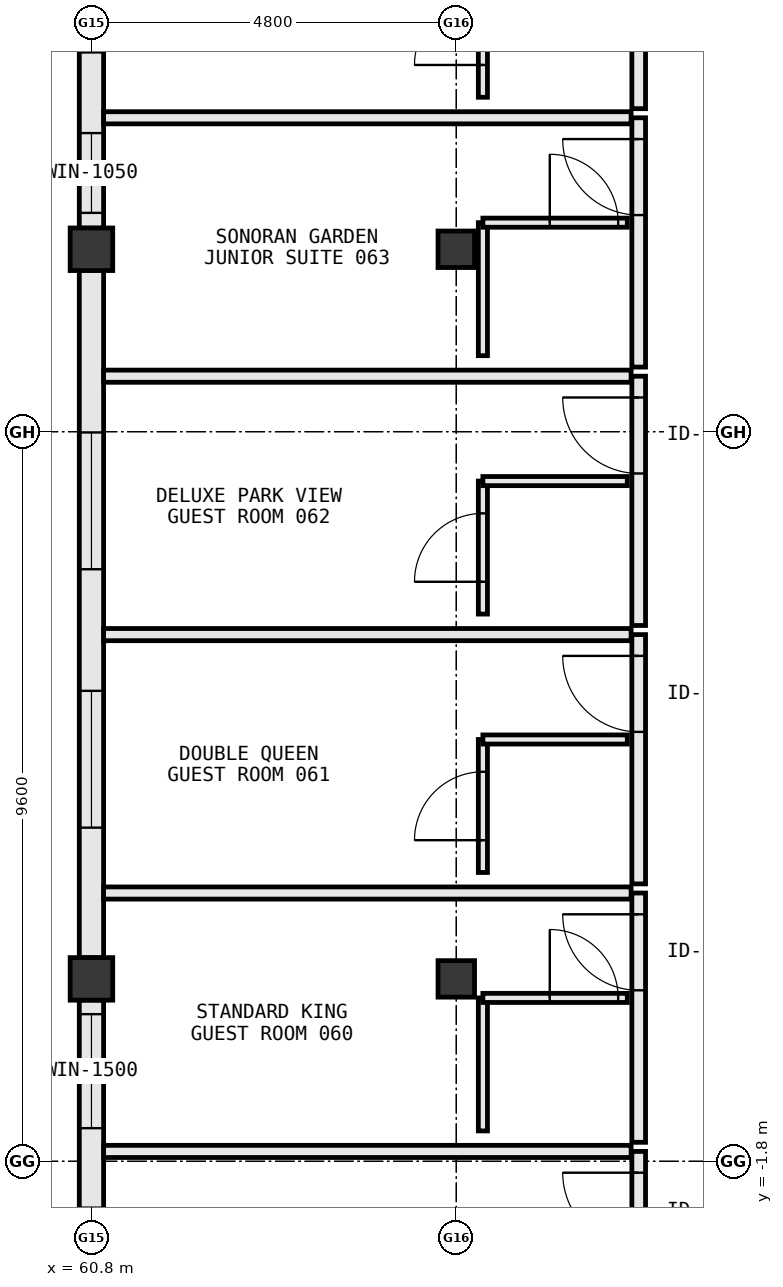
"""IFC4 building model, lengths in metres.
Left out: names, types, materials, properties, quantities, classifications, styles, units other than length and angle.
Written with IfcOpenShell. Run it as: python <this file> out.ifc"""

import sys

from ifc_helpers import new_model, si_unit, direction, frame, frame_2d, origin, origin_2d, place, context, subcontext, project, spatial, rectangle, extrude, element, fill, save


model = new_model("IFC4")
c1 = context("Model", 3, precision=1e-05, world=origin(), true_north=direction((0.0, 1.0)))
c2 = subcontext(c1, "Body", "Model", "MODEL_VIEW")
j1 = project(units=[si_unit("LENGTHUNIT", "METRE"), si_unit("PLANEANGLEUNIT", "RADIAN")], contexts=[c1])
p1 = place(None, origin())
s1 = spatial("IfcSite", under=j1, at=p1, CompositionType="ELEMENT")
p2 = place(p1, origin())
s2 = spatial("IfcBuilding", under=s1, at=p2, CompositionType="ELEMENT")
p3 = place(p2, frame((0.0, 0.0, 16.2)))
s3 = spatial("IfcBuildingStorey", under=s2, at=p3, CompositionType="ELEMENT", Elevation=16.2)
for number, where, z_axis, x_axis in (
    (1, (60.8, 0.6, 0.0), (0.0, 0.0, 1.0), (1.0, 0.0, 0.0)),
    (2, (60.8, 10.2, 0.0), (0.0, 0.0, 1.0), (1.0, 0.0, 0.0)),
):
    element("IfcColumn", number, at=place(p3, frame(where, z_axis=z_axis, x_axis=x_axis)), inside=s3, PredefinedType="COLUMN", context=c2, shape_type="SweptSolid", body=[
        extrude(rectangle(XDim=0.56, YDim=0.56, at=origin_2d()), origin(), (0.0, 0.0, 1.0), 3.8),
    ])
for number, where, z_axis, x_axis in (
    (3, (65.6, 0.6, 0.0), (0.0, 0.0, 1.0), (1.0, 0.0, 0.0)),
    (4, (65.6, 10.2, 0.0), (0.0, 0.0, 1.0), (1.0, 0.0, 0.0)),
):
    element("IfcColumn", number, at=place(p3, frame(where, z_axis=z_axis, x_axis=x_axis)), inside=s3, PredefinedType="COLUMN", context=c2, shape_type="SweptSolid", body=[
        extrude(rectangle(XDim=0.48, YDim=0.48, at=origin_2d()), origin(), (0.0, 0.0, 1.0), 3.8),
    ])
p4 = place(p3, frame((60.8, 18.322, 0.0), z_axis=(0.0, 0.0, 1.0), x_axis=(0.0, -1.0, 0.0)))
e5 = element("IfcWall", 5, at=p4, inside=s3, PredefinedType="STANDARD", context=c2, shape_type="SweptSolid", body=[
    extrude(rectangle(XDim=7.844, YDim=0.32, at=frame_2d((3.922, 0.0))), origin(), (0.0, 0.0, 1.0), 3.015),
])
p5 = place(p4, frame((6.593, 0.0, 0.85)))
e6 = element("IfcOpeningElement", 6, at=p5, cuts=e5, PredefinedType="OPENING", context=c2, shape_type="SweptSolid", body=[
    extrude(rectangle(XDim=1.05, YDim=1.45, at=frame_2d((0.525, 0.725))), frame((0.0, 0.172, 0.0), z_axis=(0.0, -1.0, 0.0), x_axis=(1.0, 0.0, 0.0)), (0.0, 0.0, 1.0), 0.344),
])
p6 = place(p4, frame((3.732, 0.0, 0.85)))
e7 = element("IfcOpeningElement", 7, at=p6, cuts=e5, PredefinedType="OPENING", context=c2, shape_type="SweptSolid", body=[
    extrude(rectangle(XDim=1.8, YDim=1.85, at=frame_2d((0.9, 0.925))), frame((0.0, 0.172, 0.0), z_axis=(0.0, -1.0, 0.0), x_axis=(1.0, 0.0, 0.0)), (0.0, 0.0, 1.0), 0.344),
])
p7 = place(p4, frame((0.536, 0.0, 0.85)))
e8 = element("IfcOpeningElement", 8, at=p7, cuts=e5, PredefinedType="OPENING", context=c2, shape_type="SweptSolid", body=[
    extrude(rectangle(XDim=1.8, YDim=1.85, at=frame_2d((0.9, 0.925))), frame((0.0, 0.172, 0.0), z_axis=(0.0, -1.0, 0.0), x_axis=(1.0, 0.0, 0.0)), (0.0, 0.0, 1.0), 0.344),
])
p8 = place(p3, frame((60.8, 9.922, 0.0), z_axis=(0.0, 0.0, 1.0), x_axis=(0.0, -1.0, 0.0)))
e9 = element("IfcWall", 9, at=p8, inside=s3, PredefinedType="STANDARD", context=c2, shape_type="SweptSolid", body=[
    extrude(rectangle(XDim=9.044, YDim=0.32, at=frame_2d((4.522, 0.0))), origin(), (0.0, 0.0, 1.0), 2.915),
])
p9 = place(p8, frame((5.532, 0.0, 0.85)))
e10 = element("IfcOpeningElement", 10, at=p9, cuts=e9, PredefinedType="OPENING", context=c2, shape_type="SweptSolid", body=[
    extrude(rectangle(XDim=1.8, YDim=1.85, at=frame_2d((0.9, 0.925))), frame((0.0, 0.172, 0.0), z_axis=(0.0, -1.0, 0.0), x_axis=(1.0, 0.0, 0.0)), (0.0, 0.0, 1.0), 0.344),
])
p10 = place(p8, frame((2.132, 0.0, 0.85)))
e11 = element("IfcOpeningElement", 11, at=p10, cuts=e9, PredefinedType="OPENING", context=c2, shape_type="SweptSolid", body=[
    extrude(rectangle(XDim=1.8, YDim=1.85, at=frame_2d((0.9, 0.925))), frame((0.0, 0.172, 0.0), z_axis=(0.0, -1.0, 0.0), x_axis=(1.0, 0.0, 0.0)), (0.0, 0.0, 1.0), 0.344),
])
p11 = place(p3, frame((60.8, 0.322, 0.0), z_axis=(0.0, 0.0, 1.0), x_axis=(0.0, -1.0, 0.0)))
e12 = element("IfcWall", 12, at=p11, inside=s3, PredefinedType="STANDARD", context=c2, shape_type="SweptSolid", body=[
    extrude(rectangle(XDim=9.044, YDim=0.32, at=frame_2d((4.522, 0.0))), origin(), (0.0, 0.0, 1.0), 2.915),
])
p12 = place(p11, frame((5.808, 0.0, 0.85)))
e13 = element("IfcOpeningElement", 13, at=p12, cuts=e12, PredefinedType="OPENING", context=c2, shape_type="SweptSolid", body=[
    extrude(rectangle(XDim=1.95, YDim=1.9, at=frame_2d((0.975, 0.95))), frame((0.0, 0.172, 0.0), z_axis=(0.0, -1.0, 0.0), x_axis=(1.0, 0.0, 0.0)), (0.0, 0.0, 1.0), 0.344),
])
p13 = place(p11, frame((2.732, 0.0, 0.85)))
e14 = element("IfcOpeningElement", 14, at=p13, cuts=e12, PredefinedType="OPENING", context=c2, shape_type="SweptSolid", body=[
    extrude(rectangle(XDim=1.8, YDim=1.85, at=frame_2d((0.9, 0.925))), frame((0.0, 0.172, 0.0), z_axis=(0.0, -1.0, 0.0), x_axis=(1.0, 0.0, 0.0)), (0.0, 0.0, 1.0), 0.344),
])
p14 = place(p11, frame((0.186, 0.0, 0.85)))
e15 = element("IfcOpeningElement", 15, at=p14, cuts=e12, PredefinedType="OPENING", context=c2, shape_type="SweptSolid", body=[
    extrude(rectangle(XDim=1.5, YDim=1.75, at=frame_2d((0.75, 0.875))), frame((0.0, 0.172, 0.0), z_axis=(0.0, -1.0, 0.0), x_axis=(1.0, 0.0, 0.0)), (0.0, 0.0, 1.0), 0.344),
])
p15 = place(p3, frame((68.0, -4.95, 0.0), z_axis=(0.0, 0.0, 1.0), x_axis=(0.0, 1.0, 0.0)))
e16 = element("IfcWall", 16, at=p15, inside=s3, PredefinedType="PARTITIONING", context=c2, shape_type="SweptSolid", body=[
    extrude(rectangle(XDim=3.28, YDim=0.18, at=frame_2d((1.64, 0.0))), origin(), (0.0, 0.0, 1.0), 3.56),
])
p16 = place(p15, frame((2.0, 0.0, 0.0)))
e17 = element("IfcOpeningElement", 17, at=p16, cuts=e16, PredefinedType="OPENING", context=c2, shape_type="SweptSolid", body=[
    extrude(rectangle(XDim=1.0, YDim=2.2, at=frame_2d((0.5, 1.1))), frame((0.0, 0.102, 0.0), z_axis=(0.0, -1.0, 0.0), x_axis=(1.0, 0.0, 0.0)), (0.0, 0.0, 1.0), 0.204),
])
p17 = place(p3, frame((60.96, -1.67, 0.0), z_axis=(0.0, 0.0, 1.0), x_axis=(1.0, 0.0, 0.0)))
e18 = element("IfcWall", 18, at=p17, inside=s3, PredefinedType="PARTITIONING", context=c2, shape_type="SweptSolid", body=[
    extrude(rectangle(XDim=6.94, YDim=0.16, at=frame_2d((3.47, 0.0))), origin(), (0.0, 0.0, 1.0), 3.56),
])
p18 = place(p3, frame((68.0, -1.55, 0.0), z_axis=(0.0, 0.0, 1.0), x_axis=(0.0, 1.0, 0.0)))
e19 = element("IfcWall", 19, at=p18, inside=s3, PredefinedType="PARTITIONING", context=c2, shape_type="SweptSolid", body=[
    extrude(rectangle(XDim=3.28, YDim=0.18, at=frame_2d((1.64, 0.0))), origin(), (0.0, 0.0, 1.0), 3.56),
])
p19 = place(p18, frame((2.0, 0.0, 0.0)))
e20 = element("IfcOpeningElement", 20, at=p19, cuts=e19, PredefinedType="OPENING", context=c2, shape_type="SweptSolid", body=[
    extrude(rectangle(XDim=1.0, YDim=2.2, at=frame_2d((0.5, 1.1))), frame((0.0, 0.102, 0.0), z_axis=(0.0, -1.0, 0.0), x_axis=(1.0, 0.0, 0.0)), (0.0, 0.0, 1.0), 0.204),
])
p20 = place(p3, frame((60.96, 1.73, 0.0), z_axis=(0.0, 0.0, 1.0), x_axis=(1.0, 0.0, 0.0)))
e21 = element("IfcWall", 21, at=p20, inside=s3, PredefinedType="PARTITIONING", context=c2, shape_type="SweptSolid", body=[
    extrude(rectangle(XDim=6.94, YDim=0.16, at=frame_2d((3.47, 0.0))), origin(), (0.0, 0.0, 1.0), 3.56),
])
p21 = place(p3, frame((65.95, -1.4, 0.0), z_axis=(0.0, 0.0, 1.0), x_axis=(0.0, 1.0, 0.0)))
e22 = element("IfcWall", 22, at=p21, inside=s3, PredefinedType="PARTITIONING", context=c2, shape_type="SweptSolid", body=[
    extrude(rectangle(XDim=1.75, YDim=0.12, at=frame_2d((0.875, 0.0))), origin(), (0.0, 0.0, 1.0), 2.915),
])
p22 = place(p3, frame((65.95, 0.35, 0.0), z_axis=(0.0, 0.0, 1.0), x_axis=(1.0, 0.0, 0.0)))
e23 = element("IfcWall", 23, at=p22, inside=s3, PredefinedType="PARTITIONING", context=c2, shape_type="SweptSolid", body=[
    extrude(rectangle(XDim=1.9, YDim=0.12, at=frame_2d((0.95, 0.0))), origin(), (0.0, 0.0, 1.0), 2.915),
])
p23 = place(p22, frame((0.88, 0.0, 0.0)))
e24 = element("IfcOpeningElement", 24, at=p23, cuts=e23, PredefinedType="OPENING", context=c2, shape_type="SweptSolid", body=[
    extrude(rectangle(XDim=0.9, YDim=2.15, at=frame_2d((0.45, 1.075))), frame((0.0, 0.072, 0.0), z_axis=(0.0, -1.0, 0.0), x_axis=(1.0, 0.0, 0.0)), (0.0, 0.0, 1.0), 0.144),
])
p24 = place(p3, frame((68.0, 1.85, 0.0), z_axis=(0.0, 0.0, 1.0), x_axis=(0.0, 1.0, 0.0)))
e25 = element("IfcWall", 25, at=p24, inside=s3, PredefinedType="PARTITIONING", context=c2, shape_type="SweptSolid", body=[
    extrude(rectangle(XDim=3.28, YDim=0.18, at=frame_2d((1.64, 0.0))), origin(), (0.0, 0.0, 1.0), 3.56),
])
p25 = place(p24, frame((2.0, 0.0, 0.0)))
e26 = element("IfcOpeningElement", 26, at=p25, cuts=e25, PredefinedType="OPENING", context=c2, shape_type="SweptSolid", body=[
    extrude(rectangle(XDim=1.0, YDim=2.2, at=frame_2d((0.5, 1.1))), frame((0.0, 0.102, 0.0), z_axis=(0.0, -1.0, 0.0), x_axis=(1.0, 0.0, 0.0)), (0.0, 0.0, 1.0), 0.204),
])
p26 = place(p3, frame((60.96, 5.13, 0.0), z_axis=(0.0, 0.0, 1.0), x_axis=(1.0, 0.0, 0.0)))
e27 = element("IfcWall", 27, at=p26, inside=s3, PredefinedType="PARTITIONING", context=c2, shape_type="SweptSolid", body=[
    extrude(rectangle(XDim=6.94, YDim=0.16, at=frame_2d((3.47, 0.0))), origin(), (0.0, 0.0, 1.0), 3.56),
])
p27 = place(p3, frame((65.95, 2.0, 0.0), z_axis=(0.0, 0.0, 1.0), x_axis=(0.0, 1.0, 0.0)))
e28 = element("IfcWall", 28, at=p27, inside=s3, PredefinedType="PARTITIONING", context=c2, shape_type="SweptSolid", body=[
    extrude(rectangle(XDim=1.75, YDim=0.12, at=frame_2d((0.875, 0.0))), origin(), (0.0, 0.0, 1.0), 2.915),
])
p28 = place(p27, frame((0.425, 0.0, 0.0)))
e29 = element("IfcOpeningElement", 29, at=p28, cuts=e28, PredefinedType="OPENING", context=c2, shape_type="SweptSolid", body=[
    extrude(rectangle(XDim=0.9, YDim=2.15, at=frame_2d((0.45, 1.075))), frame((0.0, 0.072, 0.0), z_axis=(0.0, -1.0, 0.0), x_axis=(1.0, 0.0, 0.0)), (0.0, 0.0, 1.0), 0.144),
])
p29 = place(p3, frame((65.95, 3.75, 0.0), z_axis=(0.0, 0.0, 1.0), x_axis=(1.0, 0.0, 0.0)))
e30 = element("IfcWall", 30, at=p29, inside=s3, PredefinedType="PARTITIONING", context=c2, shape_type="SweptSolid", body=[
    extrude(rectangle(XDim=1.9, YDim=0.12, at=frame_2d((0.95, 0.0))), origin(), (0.0, 0.0, 1.0), 3.56),
])
p30 = place(p3, frame((68.0, 5.25, 0.0), z_axis=(0.0, 0.0, 1.0), x_axis=(0.0, 1.0, 0.0)))
e31 = element("IfcWall", 31, at=p30, inside=s3, PredefinedType="PARTITIONING", context=c2, shape_type="SweptSolid", body=[
    extrude(rectangle(XDim=3.28, YDim=0.18, at=frame_2d((1.64, 0.0))), origin(), (0.0, 0.0, 1.0), 3.56),
])
p31 = place(p30, frame((2.0, 0.0, 0.0)))
e32 = element("IfcOpeningElement", 32, at=p31, cuts=e31, PredefinedType="OPENING", context=c2, shape_type="SweptSolid", body=[
    extrude(rectangle(XDim=1.0, YDim=2.2, at=frame_2d((0.5, 1.1))), frame((0.0, 0.102, 0.0), z_axis=(0.0, -1.0, 0.0), x_axis=(1.0, 0.0, 0.0)), (0.0, 0.0, 1.0), 0.204),
])
p32 = place(p3, frame((60.96, 8.53, 0.0), z_axis=(0.0, 0.0, 1.0), x_axis=(1.0, 0.0, 0.0)))
e33 = element("IfcWall", 33, at=p32, inside=s3, PredefinedType="PARTITIONING", context=c2, shape_type="SweptSolid", body=[
    extrude(rectangle(XDim=6.94, YDim=0.16, at=frame_2d((3.47, 0.0))), origin(), (0.0, 0.0, 1.0), 3.56),
])
p33 = place(p3, frame((65.95, 5.4, 0.0), z_axis=(0.0, 0.0, 1.0), x_axis=(0.0, 1.0, 0.0)))
e34 = element("IfcWall", 34, at=p33, inside=s3, PredefinedType="PARTITIONING", context=c2, shape_type="SweptSolid", body=[
    extrude(rectangle(XDim=1.75, YDim=0.12, at=frame_2d((0.875, 0.0))), origin(), (0.0, 0.0, 1.0), 2.915),
])
p34 = place(p33, frame((0.425, 0.0, 0.0)))
e35 = element("IfcOpeningElement", 35, at=p34, cuts=e34, PredefinedType="OPENING", context=c2, shape_type="SweptSolid", body=[
    extrude(rectangle(XDim=0.9, YDim=2.15, at=frame_2d((0.45, 1.075))), frame((0.0, 0.072, 0.0), z_axis=(0.0, -1.0, 0.0), x_axis=(1.0, 0.0, 0.0)), (0.0, 0.0, 1.0), 0.144),
])
p35 = place(p3, frame((65.95, 7.15, 0.0), z_axis=(0.0, 0.0, 1.0), x_axis=(1.0, 0.0, 0.0)))
e36 = element("IfcWall", 36, at=p35, inside=s3, PredefinedType="PARTITIONING", context=c2, shape_type="SweptSolid", body=[
    extrude(rectangle(XDim=1.9, YDim=0.12, at=frame_2d((0.95, 0.0))), origin(), (0.0, 0.0, 1.0), 3.56),
])
p36 = place(p3, frame((68.0, 8.65, 0.0), z_axis=(0.0, 0.0, 1.0), x_axis=(0.0, 1.0, 0.0)))
e37 = element("IfcWall", 37, at=p36, inside=s3, PredefinedType="PARTITIONING", context=c2, shape_type="SweptSolid", body=[
    extrude(rectangle(XDim=3.28, YDim=0.18, at=frame_2d((1.64, 0.0))), origin(), (0.0, 0.0, 1.0), 3.56),
])
p37 = place(p36, frame((2.0, 0.0, 0.0)))
e38 = element("IfcOpeningElement", 38, at=p37, cuts=e37, PredefinedType="OPENING", context=c2, shape_type="SweptSolid", body=[
    extrude(rectangle(XDim=1.0, YDim=2.2, at=frame_2d((0.5, 1.1))), frame((0.0, 0.102, 0.0), z_axis=(0.0, -1.0, 0.0), x_axis=(1.0, 0.0, 0.0)), (0.0, 0.0, 1.0), 0.204),
])
p38 = place(p3, frame((60.96, 11.93, 0.0), z_axis=(0.0, 0.0, 1.0), x_axis=(1.0, 0.0, 0.0)))
e39 = element("IfcWall", 39, at=p38, inside=s3, PredefinedType="PARTITIONING", context=c2, shape_type="SweptSolid", body=[
    extrude(rectangle(XDim=6.94, YDim=0.16, at=frame_2d((3.47, 0.0))), origin(), (0.0, 0.0, 1.0), 3.56),
])
p39 = place(p3, frame((65.95, 8.8, 0.0), z_axis=(0.0, 0.0, 1.0), x_axis=(0.0, 1.0, 0.0)))
e40 = element("IfcWall", 40, at=p39, inside=s3, PredefinedType="PARTITIONING", context=c2, shape_type="SweptSolid", body=[
    extrude(rectangle(XDim=1.75, YDim=0.12, at=frame_2d((0.875, 0.0))), origin(), (0.0, 0.0, 1.0), 2.915),
])
p40 = place(p3, frame((65.95, 10.55, 0.0), z_axis=(0.0, 0.0, 1.0), x_axis=(1.0, 0.0, 0.0)))
e41 = element("IfcWall", 41, at=p40, inside=s3, PredefinedType="PARTITIONING", context=c2, shape_type="SweptSolid", body=[
    extrude(rectangle(XDim=1.9, YDim=0.12, at=frame_2d((0.95, 0.0))), origin(), (0.0, 0.0, 1.0), 2.915),
])
p41 = place(p40, frame((0.88, 0.0, 0.0)))
e42 = element("IfcOpeningElement", 42, at=p41, cuts=e41, PredefinedType="OPENING", context=c2, shape_type="SweptSolid", body=[
    extrude(rectangle(XDim=0.9, YDim=2.15, at=frame_2d((0.45, 1.075))), frame((0.0, 0.072, 0.0), z_axis=(0.0, -1.0, 0.0), x_axis=(1.0, 0.0, 0.0)), (0.0, 0.0, 1.0), 0.144),
])
p42 = place(p3, frame((68.0, 12.05, 0.0), z_axis=(0.0, 0.0, 1.0), x_axis=(0.0, 1.0, 0.0)))
e43 = element("IfcWall", 43, at=p42, inside=s3, PredefinedType="PARTITIONING", context=c2, shape_type="SweptSolid", body=[
    extrude(rectangle(XDim=3.28, YDim=0.18, at=frame_2d((1.64, 0.0))), origin(), (0.0, 0.0, 1.0), 3.56),
])
p43 = place(p42, frame((2.0, 0.0, 0.0)))
e44 = element("IfcOpeningElement", 44, at=p43, cuts=e43, PredefinedType="OPENING", context=c2, shape_type="SweptSolid", body=[
    extrude(rectangle(XDim=1.0, YDim=2.2, at=frame_2d((0.5, 1.1))), frame((0.0, 0.102, 0.0), z_axis=(0.0, -1.0, 0.0), x_axis=(1.0, 0.0, 0.0)), (0.0, 0.0, 1.0), 0.204),
])
p44 = place(p3, frame((65.95, 12.2, 0.0), z_axis=(0.0, 0.0, 1.0), x_axis=(0.0, 1.0, 0.0)))
e45 = element("IfcWall", 45, at=p44, inside=s3, PredefinedType="PARTITIONING", context=c2, shape_type="SweptSolid", body=[
    extrude(rectangle(XDim=1.75, YDim=0.12, at=frame_2d((0.875, 0.0))), origin(), (0.0, 0.0, 1.0), 3.015),
])
p45 = place(p44, frame((0.425, 0.0, 0.0)))
e46 = element("IfcOpeningElement", 46, at=p45, cuts=e45, PredefinedType="OPENING", context=c2, shape_type="SweptSolid", body=[
    extrude(rectangle(XDim=0.9, YDim=2.15, at=frame_2d((0.45, 1.075))), frame((0.0, 0.072, 0.0), z_axis=(0.0, -1.0, 0.0), x_axis=(1.0, 0.0, 0.0)), (0.0, 0.0, 1.0), 0.144),
])
p46 = place(p13, origin())
e47 = element("IfcWindow", 47, at=p46, inside=s3, PartitioningType="SINGLE_PANEL", PredefinedType="WINDOW", context=c2, shape_type="SweptSolid", body=[
    extrude(rectangle(XDim=1.8, YDim=1.85, at=frame_2d((0.9, 0.925))), frame((0.0, 0.03, 0.0), z_axis=(0.0, -1.0, 0.0), x_axis=(1.0, 0.0, 0.0)), (0.0, 0.0, 1.0), 0.06),
])
fill(e14, e47)
p47 = place(p14, origin())
e48 = element("IfcWindow", 48, at=p47, inside=s3, PartitioningType="SINGLE_PANEL", PredefinedType="WINDOW", context=c2, shape_type="SweptSolid", body=[
    extrude(rectangle(XDim=1.5, YDim=1.75, at=frame_2d((0.75, 0.875))), frame((0.0, 0.03, 0.0), z_axis=(0.0, -1.0, 0.0), x_axis=(1.0, 0.0, 0.0)), (0.0, 0.0, 1.0), 0.06),
])
fill(e15, e48)
p48 = place(p9, origin())
e49 = element("IfcWindow", 49, at=p48, inside=s3, PartitioningType="SINGLE_PANEL", PredefinedType="WINDOW", context=c2, shape_type="SweptSolid", body=[
    extrude(rectangle(XDim=1.8, YDim=1.85, at=frame_2d((0.9, 0.925))), frame((0.0, 0.03, 0.0), z_axis=(0.0, -1.0, 0.0), x_axis=(1.0, 0.0, 0.0)), (0.0, 0.0, 1.0), 0.06),
])
fill(e10, e49)
p49 = place(p10, origin())
e50 = element("IfcWindow", 50, at=p49, inside=s3, PartitioningType="SINGLE_PANEL", PredefinedType="WINDOW", context=c2, shape_type="SweptSolid", body=[
    extrude(rectangle(XDim=1.8, YDim=1.85, at=frame_2d((0.9, 0.925))), frame((0.0, 0.03, 0.0), z_axis=(0.0, -1.0, 0.0), x_axis=(1.0, 0.0, 0.0)), (0.0, 0.0, 1.0), 0.06),
])
fill(e11, e50)
p50 = place(p5, origin())
e51 = element("IfcWindow", 51, at=p50, inside=s3, PartitioningType="SINGLE_PANEL", PredefinedType="WINDOW", context=c2, shape_type="SweptSolid", body=[
    extrude(rectangle(XDim=1.05, YDim=1.45, at=frame_2d((0.525, 0.725))), frame((0.0, 0.03, 0.0), z_axis=(0.0, -1.0, 0.0), x_axis=(1.0, 0.0, 0.0)), (0.0, 0.0, 1.0), 0.06),
])
fill(e6, e51)
p51 = place(p16, origin())
e52 = element("IfcDoor", 52, at=p51, inside=s3, OperationType="SINGLE_SWING_RIGHT", PredefinedType="DOOR", context=c2, shape_type="SweptSolid", body=[
    extrude(rectangle(XDim=1.0, YDim=2.2, at=frame_2d((0.5, 1.1))), frame((0.0, 0.025, 0.0), z_axis=(0.0, -1.0, 0.0), x_axis=(1.0, 0.0, 0.0)), (0.0, 0.0, 1.0), 0.05),
])
fill(e17, e52)
p52 = place(p19, origin())
e53 = element("IfcDoor", 53, at=p52, inside=s3, OperationType="SINGLE_SWING_RIGHT", PredefinedType="DOOR", context=c2, shape_type="SweptSolid", body=[
    extrude(rectangle(XDim=1.0, YDim=2.2, at=frame_2d((0.5, 1.1))), frame((0.0, 0.025, 0.0), z_axis=(0.0, -1.0, 0.0), x_axis=(1.0, 0.0, 0.0)), (0.0, 0.0, 1.0), 0.05),
])
fill(e20, e53)
p53 = place(p23, origin())
e54 = element("IfcDoor", 54, at=p53, inside=s3, OperationType="SINGLE_SWING_LEFT", PredefinedType="DOOR", context=c2, shape_type="SweptSolid", body=[
    extrude(rectangle(XDim=0.9, YDim=2.15, at=frame_2d((0.45, 1.075))), frame((0.0, 0.025, 0.0), z_axis=(0.0, -1.0, 0.0), x_axis=(1.0, 0.0, 0.0)), (0.0, 0.0, 1.0), 0.05),
])
fill(e24, e54)
p54 = place(p25, origin())
e55 = element("IfcDoor", 55, at=p54, inside=s3, OperationType="SINGLE_SWING_RIGHT", PredefinedType="DOOR", context=c2, shape_type="SweptSolid", body=[
    extrude(rectangle(XDim=1.0, YDim=2.2, at=frame_2d((0.5, 1.1))), frame((0.0, 0.025, 0.0), z_axis=(0.0, -1.0, 0.0), x_axis=(1.0, 0.0, 0.0)), (0.0, 0.0, 1.0), 0.05),
])
fill(e26, e55)
p55 = place(p28, origin())
e56 = element("IfcDoor", 56, at=p55, inside=s3, OperationType="SINGLE_SWING_LEFT", PredefinedType="DOOR", context=c2, shape_type="SweptSolid", body=[
    extrude(rectangle(XDim=0.9, YDim=2.15, at=frame_2d((0.45, 1.075))), frame((0.0, 0.025, 0.0), z_axis=(0.0, -1.0, 0.0), x_axis=(1.0, 0.0, 0.0)), (0.0, 0.0, 1.0), 0.05),
])
fill(e29, e56)
p56 = place(p31, origin())
e57 = element("IfcDoor", 57, at=p56, inside=s3, OperationType="SINGLE_SWING_RIGHT", PredefinedType="DOOR", context=c2, shape_type="SweptSolid", body=[
    extrude(rectangle(XDim=1.0, YDim=2.2, at=frame_2d((0.5, 1.1))), frame((0.0, 0.025, 0.0), z_axis=(0.0, -1.0, 0.0), x_axis=(1.0, 0.0, 0.0)), (0.0, 0.0, 1.0), 0.05),
])
fill(e32, e57)
p57 = place(p34, origin())
e58 = element("IfcDoor", 58, at=p57, inside=s3, OperationType="SINGLE_SWING_LEFT", PredefinedType="DOOR", context=c2, shape_type="SweptSolid", body=[
    extrude(rectangle(XDim=0.9, YDim=2.15, at=frame_2d((0.45, 1.075))), frame((0.0, 0.025, 0.0), z_axis=(0.0, -1.0, 0.0), x_axis=(1.0, 0.0, 0.0)), (0.0, 0.0, 1.0), 0.05),
])
fill(e35, e58)
p58 = place(p37, origin())
e59 = element("IfcDoor", 59, at=p58, inside=s3, OperationType="SINGLE_SWING_RIGHT", PredefinedType="DOOR", context=c2, shape_type="SweptSolid", body=[
    extrude(rectangle(XDim=1.0, YDim=2.2, at=frame_2d((0.5, 1.1))), frame((0.0, 0.025, 0.0), z_axis=(0.0, -1.0, 0.0), x_axis=(1.0, 0.0, 0.0)), (0.0, 0.0, 1.0), 0.05),
])
fill(e38, e59)
p59 = place(p41, origin())
e60 = element("IfcDoor", 60, at=p59, inside=s3, OperationType="SINGLE_SWING_LEFT", PredefinedType="DOOR", context=c2, shape_type="SweptSolid", body=[
    extrude(rectangle(XDim=0.9, YDim=2.15, at=frame_2d((0.45, 1.075))), frame((0.0, 0.025, 0.0), z_axis=(0.0, -1.0, 0.0), x_axis=(1.0, 0.0, 0.0)), (0.0, 0.0, 1.0), 0.05),
])
fill(e42, e60)
p60 = place(p45, origin())
e61 = element("IfcDoor", 61, at=p60, inside=s3, OperationType="SINGLE_SWING_LEFT", PredefinedType="DOOR", context=c2, shape_type="SweptSolid", body=[
    extrude(rectangle(XDim=0.9, YDim=2.15, at=frame_2d((0.45, 1.075))), frame((0.0, 0.025, 0.0), z_axis=(0.0, -1.0, 0.0), x_axis=(1.0, 0.0, 0.0)), (0.0, 0.0, 1.0), 0.05),
])
fill(e46, e61)
save(model, sys.argv[1])
